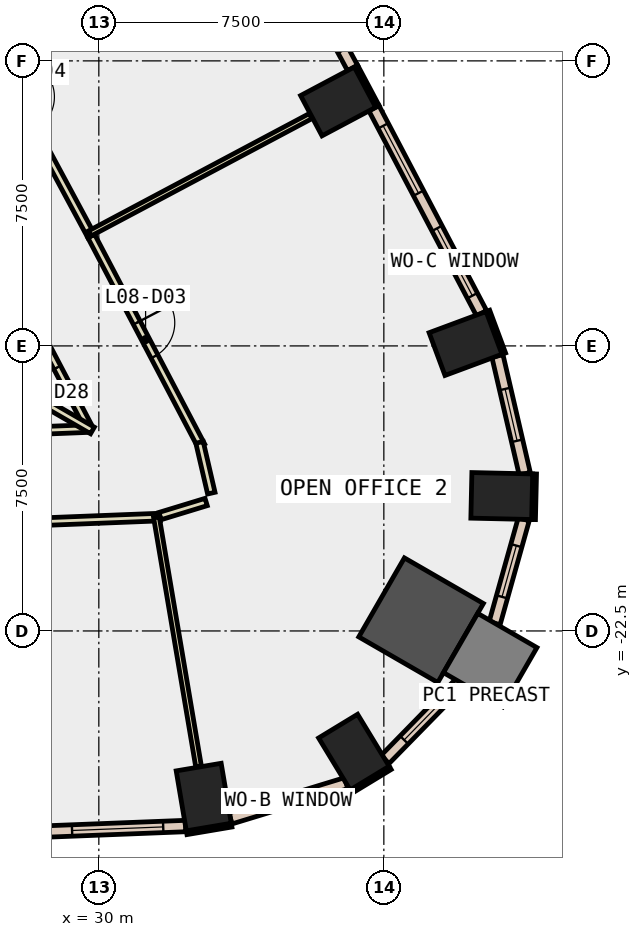
"""IFC4 building model, lengths in metres.
Left out: names, types, materials, properties, quantities, classifications, styles, units other than length and angle.
Written with IfcOpenShell. Run it as: python <this file> out.ifc"""

import sys

from ifc_helpers import new_model, si_unit, direction, frame, frame_2d, origin, origin_2d, place, context, subcontext, project, spatial, rectangle, extrude, element, fill, save


model = new_model("IFC4")
c1 = context("Model", 3, precision=1e-05, world=origin(), true_north=direction((0.0, 1.0)))
c2 = subcontext(c1, "Body", "Model", "MODEL_VIEW")
j1 = project(units=[si_unit("LENGTHUNIT", "METRE"), si_unit("PLANEANGLEUNIT", "RADIAN")], contexts=[c1])
p1 = place(None, origin())
s1 = spatial("IfcSite", under=j1, at=p1, CompositionType="ELEMENT")
p2 = place(p1, origin())
s2 = spatial("IfcBuilding", under=s1, at=p2, CompositionType="ELEMENT")
p3 = place(p2, frame((0.0, 0.0, 43.4)))
s3 = spatial("IfcBuildingStorey", under=s2, at=p3, CompositionType="ELEMENT", Elevation=43.4)
for number, where, z_axis, x_axis in (
    (1, (32.761, -26.871, -0.4), (0.0, 0.0, 1.0), (0.986, 0.167, 0.0)),
    (2, (36.712, -25.688, -0.4), (0.0, 0.0, 1.0), (0.855, 0.519, 0.0)),
):
    element("IfcColumn", number, at=place(p3, frame(where, z_axis=z_axis, x_axis=x_axis)), inside=s3, PredefinedType="COLUMN", context=c2, shape_type="SweptSolid", body=[
        extrude(rectangle(XDim=1.2, YDim=1.6, at=origin_2d()), origin(), (0.0, 0.0, 1.0), 4.2),
    ])
p4 = place(p3, frame((38.48, -22.217, -0.4), z_axis=(0.0, 0.0, 1.0), x_axis=(-0.866025403784, 0.5, 0.0)))
e3 = element("IfcColumn", 3, at=p4, inside=s3, PredefinedType="COLUMN", context=c2, shape_type="SweptSolid", body=[
    extrude(rectangle(XDim=2.4, YDim=2.4, at=origin_2d()), origin(), (0.0, 0.0, 1.0), 4.2),
])
for number, where, z_axis, x_axis in (
    (4, (40.603, -18.95, -0.4), (0.0, 0.0, 1.0), (0.023, 1.0, 0.0)),
    (5, (39.65, -14.936, -0.4), (0.0, 0.0, 1.0), (-0.348, 0.937, 0.0)),
    (6, (36.298, -8.567, -0.4), (0.0, 0.0, 1.0), (-0.469, 0.883, 0.0)),
):
    element("IfcColumn", number, at=place(p3, frame(where, z_axis=z_axis, x_axis=x_axis)), inside=s3, PredefinedType="COLUMN", context=c2, shape_type="SweptSolid", body=[
        extrude(rectangle(XDim=1.2, YDim=1.6, at=origin_2d()), origin(), (0.0, 0.0, 1.0), 4.2),
    ])
p5 = place(p3, frame((40.299, -23.267, -0.4), z_axis=(0.0, 0.0, 1.0), x_axis=(-0.866025403784, 0.5, 0.0)))
e7 = element("IfcColumn", 7, at=p5, inside=s3, PredefinedType="COLUMN", context=c2, shape_type="SweptSolid", body=[
    extrude(rectangle(XDim=1.8, YDim=1.8, at=origin_2d()), origin(), (0.0, 0.0, 1.0), 4.2),
])
p6 = place(p3, frame((40.656, -15.203, 0.0), z_axis=(0.0, 0.0, 1.0), x_axis=(-0.348268249601, 0.937394914814, 0.0)))
e8 = element("IfcWall", 8, at=p6, inside=s3, PredefinedType="STANDARD", context=c2, shape_type="SweptSolid", body=[
    extrude(rectangle(XDim=1.2, YDim=0.1, at=frame_2d((0.6, 0.0))), origin(), (0.0, 0.0, 1.0), 3.8),
])
p7 = place(p3, frame((37.33, -8.698, 0.0), z_axis=(0.0, 0.0, 1.0), x_axis=(-0.469383408131, 0.882994459876, 0.0)))
e9 = element("IfcWall", 9, at=p7, inside=s3, PredefinedType="STANDARD", context=c2, shape_type="SweptSolid", body=[
    extrude(rectangle(XDim=1.199, YDim=0.1, at=frame_2d((0.6, 0.0))), origin(), (0.0, 0.0, 1.0), 3.8),
])
p8 = place(p3, frame((32.311, -27.809, 0.0), z_axis=(0.0, 0.0, 1.0), x_axis=(0.98597830993, 0.166873522011, 0.0)))
e10 = element("IfcWall", 10, at=p8, inside=s3, PredefinedType="STANDARD", context=c2, shape_type="SweptSolid", body=[
    extrude(rectangle(XDim=1.2, YDim=0.1, at=frame_2d((0.6, 0.0))), origin(), (0.0, 0.0, 1.0), 3.8),
])
for number, where, z_axis, x_axis in (
    (11, (36.64, -26.726, 0.0), (0.0, 0.0, 1.0), (0.855, 0.519, 0.0)),
    (12, (41.439, -19.569, 0.0), (0.0, 0.0, 1.0), (0.023, 1.0, 0.0)),
):
    element("IfcWall", number, at=place(p3, frame(where, z_axis=z_axis, x_axis=x_axis)), inside=s3, PredefinedType="STANDARD", context=c2, shape_type="SweptSolid", body=[
        extrude(rectangle(XDim=1.2, YDim=0.1, at=frame_2d((0.6, 0.0))), origin(), (0.0, 0.0, 1.0), 3.8),
    ])
p9 = place(p3, frame((25.134, -27.914, 0.0), z_axis=(0.0, 0.0, 1.0), x_axis=(0.999228146648, 0.039282450878, 0.0)))
e13 = element("IfcWall", 13, at=p9, inside=s3, PredefinedType="STANDARD", context=c2, shape_type="SweptSolid", body=[
    extrude(rectangle(XDim=7.154, YDim=0.3, at=frame_2d((3.577, 0.0))), origin(), (0.0, 0.0, 1.0), 3.8),
])
p10 = place(p9, frame((0.588, 0.0, 0.9)))
e14 = element("IfcOpeningElement", 14, at=p10, cuts=e13, PredefinedType="OPENING", context=c2, shape_type="SweptSolid", body=[
    extrude(rectangle(XDim=2.4, YDim=2.6, at=frame_2d((1.2, 1.3))), frame((0.0, 0.16, 0.0), z_axis=(0.0, -1.0, 0.0), x_axis=(1.0, 0.0, 0.0)), (0.0, 0.0, 1.0), 0.32),
])
p11 = place(p9, frame((4.165, 0.0, 0.9)))
e15 = element("IfcOpeningElement", 15, at=p11, cuts=e13, PredefinedType="OPENING", context=c2, shape_type="SweptSolid", body=[
    extrude(rectangle(XDim=2.4, YDim=2.6, at=frame_2d((1.2, 1.3))), frame((0.0, 0.16, 0.0), z_axis=(0.0, -1.0, 0.0), x_axis=(1.0, 0.0, 0.0)), (0.0, 0.0, 1.0), 0.32),
])
p12 = place(p3, frame((33.464, -27.433, 0.0), z_axis=(0.0, 0.0, 1.0), x_axis=(0.95648967224, 0.291766185322, 0.0)))
e16 = element("IfcWall", 16, at=p12, inside=s3, PredefinedType="STANDARD", context=c2, shape_type="SweptSolid", body=[
    extrude(rectangle(XDim=3.181, YDim=0.3, at=frame_2d((1.591, 0.0))), origin(), (0.0, 0.0, 1.0), 3.8),
])
p13 = place(p12, frame((0.891, 0.0, 0.9)))
e17 = element("IfcOpeningElement", 17, at=p13, cuts=e16, PredefinedType="OPENING", context=c2, shape_type="SweptSolid", body=[
    extrude(rectangle(XDim=1.4, YDim=2.6, at=frame_2d((0.7, 1.3))), frame((0.0, 0.16, 0.0), z_axis=(0.0, -1.0, 0.0), x_axis=(1.0, 0.0, 0.0)), (0.0, 0.0, 1.0), 0.32),
])
p14 = place(p3, frame((37.531, -25.883, 0.0), z_axis=(0.0, 0.0, 1.0), x_axis=(0.699151821451, 0.714973237654, 0.0)))
e18 = element("IfcWall", 18, at=p14, inside=s3, PredefinedType="STANDARD", context=c2, shape_type="SweptSolid", body=[
    extrude(rectangle(XDim=2.839, YDim=0.3, at=frame_2d((1.42, 0.0))), origin(), (0.0, 0.0, 1.0), 3.8),
])
p15 = place(p14, frame((0.72, 0.0, 0.9)))
e19 = element("IfcOpeningElement", 19, at=p15, cuts=e18, PredefinedType="OPENING", context=c2, shape_type="SweptSolid", body=[
    extrude(rectangle(XDim=1.4, YDim=2.6, at=frame_2d((0.7, 1.3))), frame((0.0, 0.16, 0.0), z_axis=(0.0, -1.0, 0.0), x_axis=(1.0, 0.0, 0.0)), (0.0, 0.0, 1.0), 0.32),
])
p16 = place(p3, frame((40.415, -22.296, 0.0), z_axis=(0.0, 0.0, 1.0), x_axis=(0.269754317033, 0.962929181426, 0.0)))
e20 = element("IfcWall", 20, at=p16, inside=s3, PredefinedType="STANDARD", context=c2, shape_type="SweptSolid", body=[
    extrude(rectangle(XDim=2.839, YDim=0.3, at=frame_2d((1.419, 0.0))), origin(), (0.0, 0.0, 1.0), 3.8),
])
p17 = place(p16, frame((0.72, 0.0, 0.9)))
e21 = element("IfcOpeningElement", 21, at=p17, cuts=e20, PredefinedType="OPENING", context=c2, shape_type="SweptSolid", body=[
    extrude(rectangle(XDim=1.4, YDim=2.6, at=frame_2d((0.7, 1.3))), frame((0.0, 0.16, 0.0), z_axis=(0.0, -1.0, 0.0), x_axis=(1.0, 0.0, 0.0)), (0.0, 0.0, 1.0), 0.32),
])
p18 = place(p3, frame((41.208, -18.364, 0.0), z_axis=(0.0, 0.0, 1.0), x_axis=(-0.225929520451, 0.974143650489, 0.0)))
e22 = element("IfcWall", 22, at=p18, inside=s3, PredefinedType="STANDARD", context=c2, shape_type="SweptSolid", body=[
    extrude(rectangle(XDim=3.182, YDim=0.3, at=frame_2d((1.591, 0.0))), origin(), (0.0, 0.0, 1.0), 3.8),
])
p19 = place(p18, frame((0.891, 0.0, 0.9)))
e23 = element("IfcOpeningElement", 23, at=p19, cuts=e22, PredefinedType="OPENING", context=c2, shape_type="SweptSolid", body=[
    extrude(rectangle(XDim=1.4, YDim=2.6, at=frame_2d((0.7, 1.3))), frame((0.0, 0.16, 0.0), z_axis=(0.0, -1.0, 0.0), x_axis=(1.0, 0.0, 0.0)), (0.0, 0.0, 1.0), 0.32),
])
p20 = place(p3, frame((40.072, -14.141, 0.0), z_axis=(0.0, 0.0, 1.0), x_axis=(-0.464913987781, 0.885355851602, 0.0)))
e24 = element("IfcWall", 24, at=p20, inside=s3, PredefinedType="STANDARD", context=c2, shape_type="SweptSolid", body=[
    extrude(rectangle(XDim=6.094, YDim=0.3, at=frame_2d((3.047, 0.0))), origin(), (0.0, 0.0, 1.0), 3.8),
])
p21 = place(p20, frame((0.523, 0.0, 0.9)))
e25 = element("IfcOpeningElement", 25, at=p21, cuts=e24, PredefinedType="OPENING", context=c2, shape_type="SweptSolid", body=[
    extrude(rectangle(XDim=2.0, YDim=2.6, at=frame_2d((1.0, 1.3))), frame((0.0, 0.16, 0.0), z_axis=(0.0, -1.0, 0.0), x_axis=(1.0, 0.0, 0.0)), (0.0, 0.0, 1.0), 0.32),
])
p22 = place(p20, frame((3.57, 0.0, 0.9)))
e26 = element("IfcOpeningElement", 26, at=p22, cuts=e24, PredefinedType="OPENING", context=c2, shape_type="SweptSolid", body=[
    extrude(rectangle(XDim=2.0, YDim=2.6, at=frame_2d((1.0, 1.3))), frame((0.0, 0.16, 0.0), z_axis=(0.0, -1.0, 0.0), x_axis=(1.0, 0.0, 0.0)), (0.0, 0.0, 1.0), 0.32),
])
p23 = place(p3, frame((36.677, -7.688, 0.0), z_axis=(0.0, 0.0, 1.0), x_axis=(-0.47375467653, 0.880656860795, 0.0)))
e27 = element("IfcWall", 27, at=p23, inside=s3, PredefinedType="STANDARD", context=c2, shape_type="SweptSolid", body=[
    extrude(rectangle(XDim=6.117, YDim=0.3, at=frame_2d((3.059, 0.0))), origin(), (0.0, 0.0, 1.0), 3.8),
])
p24 = place(p23, frame((0.529, 0.0, 0.9)))
e28 = element("IfcOpeningElement", 28, at=p24, cuts=e27, PredefinedType="OPENING", context=c2, shape_type="SweptSolid", body=[
    extrude(rectangle(XDim=2.0, YDim=2.6, at=frame_2d((1.0, 1.3))), frame((0.0, 0.16, 0.0), z_axis=(0.0, -1.0, 0.0), x_axis=(1.0, 0.0, 0.0)), (0.0, 0.0, 1.0), 0.32),
])
p25 = place(p23, frame((3.588, 0.0, 0.9)))
e29 = element("IfcOpeningElement", 29, at=p25, cuts=e27, PredefinedType="OPENING", context=c2, shape_type="SweptSolid", body=[
    extrude(rectangle(XDim=2.0, YDim=2.6, at=frame_2d((1.0, 1.3))), frame((0.0, 0.16, 0.0), z_axis=(0.0, -1.0, 0.0), x_axis=(1.0, 0.0, 0.0)), (0.0, 0.0, 1.0), 0.32),
])
p26 = place(p3, frame((24.18, -17.393, 0.0), z_axis=(0.0, 0.0, 1.0), x_axis=(0.999226657848, 0.039320303228, 0.0)))
e30 = element("IfcWall", 30, at=p26, inside=s3, PredefinedType="PARTITIONING", context=c2, shape_type="SweptSolid", body=[
    extrude(rectangle(XDim=5.57, YDim=0.2, at=frame_2d((2.785, 0.0))), origin(), (0.0, 0.0, 1.0), 3.8),
])
p27 = place(p26, frame((2.284, 0.0, 0.0)))
e31 = element("IfcOpeningElement", 31, at=p27, cuts=e30, PredefinedType="OPENING", context=c2, shape_type="SweptSolid", body=[
    extrude(rectangle(XDim=1.0, YDim=2.1, at=frame_2d((0.5, 1.05))), frame((0.0, 0.11, 0.0), z_axis=(0.0, -1.0, 0.0), x_axis=(1.0, 0.0, 0.0)), (0.0, 0.0, 1.0), 0.22),
])
p28 = place(p3, frame((29.702, -17.085, 0.0), z_axis=(0.0, 0.0, 1.0), x_axis=(-0.464998228159, 0.88531161057, 0.0)))
e32 = element("IfcWall", 32, at=p28, inside=s3, PredefinedType="PARTITIONING", context=c2, shape_type="SweptSolid", body=[
    extrude(rectangle(XDim=4.426, YDim=0.2, at=frame_2d((2.213, 0.0))), origin(), (0.0, 0.0, 1.0), 3.8),
])
p29 = place(p28, frame((1.713, 0.0, 0.0)))
e33 = element("IfcOpeningElement", 33, at=p29, cuts=e32, PredefinedType="OPENING", context=c2, shape_type="SweptSolid", body=[
    extrude(rectangle(XDim=1.0, YDim=2.1, at=frame_2d((0.5, 1.05))), frame((0.0, 0.11, 0.0), z_axis=(0.0, -1.0, 0.0), x_axis=(1.0, 0.0, 0.0)), (0.0, 0.0, 1.0), 0.22),
])
p30 = place(p3, frame((31.615, -19.503, 0.0), z_axis=(0.0, 0.0, 1.0), x_axis=(-0.999228381006, -0.039276489048, 0.0)))
e34 = element("IfcWall", 34, at=p30, inside=s3, PredefinedType="PARTITIONING", context=c2, shape_type="SweptSolid", body=[
    extrude(rectangle(XDim=7.36, YDim=0.2, at=frame_2d((3.68, 0.0))), origin(), (0.0, 0.0, 1.0), 3.8),
])
p31 = place(p3, frame((29.799, -12.107, 0.0), z_axis=(0.0, 0.0, 1.0), x_axis=(0.464767882002, -0.885432558617, 0.0)))
e35 = element("IfcWall", 35, at=p31, inside=s3, PredefinedType="PARTITIONING", context=c2, shape_type="SweptSolid", body=[
    extrude(rectangle(XDim=6.233, YDim=0.2, at=frame_2d((3.117, 0.0))), origin(), (0.0, 0.0, 1.0), 3.8),
])
p32 = place(p31, frame((2.58, 0.0, 0.0)))
e36 = element("IfcOpeningElement", 36, at=p32, cuts=e35, PredefinedType="OPENING", context=c2, shape_type="SweptSolid", body=[
    extrude(rectangle(XDim=1.0, YDim=2.1, at=frame_2d((0.5, 1.05))), frame((0.0, 0.11, 0.0), z_axis=(0.0, -1.0, 0.0), x_axis=(1.0, 0.0, 0.0)), (0.0, 0.0, 1.0), 0.22),
])
p33 = place(p3, frame((32.65, -17.538, 0.0), z_axis=(0.0, 0.0, 1.0), x_axis=(0.226081445763, -0.974108402531, 0.0)))
e37 = element("IfcWall", 37, at=p33, inside=s3, PredefinedType="PARTITIONING", context=c2, shape_type="SweptSolid", body=[
    extrude(rectangle(XDim=1.371, YDim=0.2, at=frame_2d((0.686, 0.0))), origin(), (0.0, 0.0, 1.0), 3.8),
])
p34 = place(p3, frame((32.824, -19.107, 0.0), z_axis=(0.0, 0.0, 1.0), x_axis=(-0.956459113118, -0.291866347723, 0.0)))
e38 = element("IfcWall", 38, at=p34, inside=s3, PredefinedType="PARTITIONING", context=c2, shape_type="SweptSolid", body=[
    extrude(rectangle(XDim=1.268, YDim=0.2, at=frame_2d((0.634, 0.0))), origin(), (0.0, 0.0, 1.0), 3.8),
])
p35 = place(p3, frame((26.337, -5.671, 0.0), z_axis=(0.0, 0.0, 1.0), x_axis=(0.473794961698, -0.880635187958, 0.0)))
e39 = element("IfcWall", 39, at=p35, inside=s3, PredefinedType="PARTITIONING", context=c2, shape_type="SweptSolid", body=[
    extrude(rectangle(XDim=7.307, YDim=0.2, at=frame_2d((3.654, 0.0))), origin(), (0.0, 0.0, 1.0), 3.8),
])
p36 = place(p35, frame((3.154, 0.0, 0.0)))
e40 = element("IfcOpeningElement", 40, at=p36, cuts=e39, PredefinedType="OPENING", context=c2, shape_type="SweptSolid", body=[
    extrude(rectangle(XDim=1.0, YDim=2.1, at=frame_2d((0.5, 1.05))), frame((0.0, 0.11, 0.0), z_axis=(0.0, -1.0, 0.0), x_axis=(1.0, 0.0, 0.0)), (0.0, 0.0, 1.0), 0.22),
])
p37 = place(p3, frame((24.811, -14.326, 0.0), z_axis=(0.0, 0.0, 1.0), x_axis=(0.866076195524, -0.499912015806, 0.0)))
e41 = element("IfcWall", 41, at=p37, inside=s3, PredefinedType="PARTITIONING", context=c2, shape_type="SweptSolid", body=[
    extrude(rectangle(XDim=5.797, YDim=0.2, at=frame_2d((2.899, 0.0))), origin(), (0.0, 0.0, 1.0), 3.8),
])
p38 = place(p3, frame((31.515, -19.506, 0.0), z_axis=(0.0, 0.0, 1.0), x_axis=(0.166785823947, -0.985993148521, 0.0)))
e42 = element("IfcWall", 42, at=p38, inside=s3, PredefinedType="PARTITIONING", context=c2, shape_type="SweptSolid", body=[
    extrude(rectangle(XDim=6.65, YDim=0.15, at=frame_2d((3.325, 0.0))), origin(), (0.0, 0.0, 1.0), 3.8),
])
p39 = place(p3, frame((29.764, -12.04, 0.0), z_axis=(0.0, 0.0, 1.0), x_axis=(0.883018657393, 0.469337885426, 0.0)))
e43 = element("IfcWall", 43, at=p39, inside=s3, PredefinedType="PARTITIONING", context=c2, shape_type="SweptSolid", body=[
    extrude(rectangle(XDim=6.58, YDim=0.15, at=frame_2d((3.29, 0.0))), origin(), (0.0, 0.0, 1.0), 3.8),
])
p40 = place(p11, origin())
e44 = element("IfcWindow", 44, at=p40, inside=s3, PartitioningType="SINGLE_PANEL", PredefinedType="WINDOW", context=c2, shape_type="SweptSolid", body=[
    extrude(rectangle(XDim=2.4, YDim=2.6, at=frame_2d((1.2, 1.3))), frame((0.0, 0.03, 0.0), z_axis=(0.0, -1.0, 0.0), x_axis=(1.0, 0.0, 0.0)), (0.0, 0.0, 1.0), 0.06),
])
fill(e15, e44)
p41 = place(p13, origin())
e45 = element("IfcWindow", 45, at=p41, inside=s3, PartitioningType="SINGLE_PANEL", PredefinedType="WINDOW", context=c2, shape_type="SweptSolid", body=[
    extrude(rectangle(XDim=1.4, YDim=2.6, at=frame_2d((0.7, 1.3))), frame((0.0, 0.03, 0.0), z_axis=(0.0, -1.0, 0.0), x_axis=(1.0, 0.0, 0.0)), (0.0, 0.0, 1.0), 0.06),
])
fill(e17, e45)
p42 = place(p15, origin())
e46 = element("IfcWindow", 46, at=p42, inside=s3, PartitioningType="SINGLE_PANEL", PredefinedType="WINDOW", context=c2, shape_type="SweptSolid", body=[
    extrude(rectangle(XDim=1.4, YDim=2.6, at=frame_2d((0.7, 1.3))), frame((0.0, 0.03, 0.0), z_axis=(0.0, -1.0, 0.0), x_axis=(1.0, 0.0, 0.0)), (0.0, 0.0, 1.0), 0.06),
])
fill(e19, e46)
p43 = place(p17, origin())
e47 = element("IfcWindow", 47, at=p43, inside=s3, PartitioningType="SINGLE_PANEL", PredefinedType="WINDOW", context=c2, shape_type="SweptSolid", body=[
    extrude(rectangle(XDim=1.4, YDim=2.6, at=frame_2d((0.7, 1.3))), frame((0.0, 0.03, 0.0), z_axis=(0.0, -1.0, 0.0), x_axis=(1.0, 0.0, 0.0)), (0.0, 0.0, 1.0), 0.06),
])
fill(e21, e47)
p44 = place(p19, origin())
e48 = element("IfcWindow", 48, at=p44, inside=s3, PartitioningType="SINGLE_PANEL", PredefinedType="WINDOW", context=c2, shape_type="SweptSolid", body=[
    extrude(rectangle(XDim=1.4, YDim=2.6, at=frame_2d((0.7, 1.3))), frame((0.0, 0.03, 0.0), z_axis=(0.0, -1.0, 0.0), x_axis=(1.0, 0.0, 0.0)), (0.0, 0.0, 1.0), 0.06),
])
fill(e23, e48)
p45 = place(p21, origin())
e49 = element("IfcWindow", 49, at=p45, inside=s3, PartitioningType="SINGLE_PANEL", PredefinedType="WINDOW", context=c2, shape_type="SweptSolid", body=[
    extrude(rectangle(XDim=2.0, YDim=2.6, at=frame_2d((1.0, 1.3))), frame((0.0, 0.03, 0.0), z_axis=(0.0, -1.0, 0.0), x_axis=(1.0, 0.0, 0.0)), (0.0, 0.0, 1.0), 0.06),
])
fill(e25, e49)
p46 = place(p22, origin())
e50 = element("IfcWindow", 50, at=p46, inside=s3, PartitioningType="SINGLE_PANEL", PredefinedType="WINDOW", context=c2, shape_type="SweptSolid", body=[
    extrude(rectangle(XDim=2.0, YDim=2.6, at=frame_2d((1.0, 1.3))), frame((0.0, 0.03, 0.0), z_axis=(0.0, -1.0, 0.0), x_axis=(1.0, 0.0, 0.0)), (0.0, 0.0, 1.0), 0.06),
])
fill(e26, e50)
p47 = place(p32, origin())
e51 = element("IfcDoor", 51, at=p47, inside=s3, OperationType="SINGLE_SWING_LEFT", PredefinedType="DOOR", context=c2, shape_type="SweptSolid", body=[
    extrude(rectangle(XDim=1.0, YDim=2.1, at=frame_2d((0.5, 1.05))), frame((0.0, 0.025, 0.0), z_axis=(0.0, -1.0, 0.0), x_axis=(1.0, 0.0, 0.0)), (0.0, 0.0, 1.0), 0.05),
])
fill(e36, e51)
p48 = place(p29, origin())
e52 = element("IfcDoor", 52, at=p48, inside=s3, OperationType="SINGLE_SWING_LEFT", PredefinedType="DOOR", context=c2, shape_type="SweptSolid", body=[
    extrude(rectangle(XDim=1.0, YDim=2.1, at=frame_2d((0.5, 1.05))), frame((0.0, 0.025, 0.0), z_axis=(0.0, -1.0, 0.0), x_axis=(1.0, 0.0, 0.0)), (0.0, 0.0, 1.0), 0.05),
])
fill(e33, e52)
save(model, sys.argv[1])
